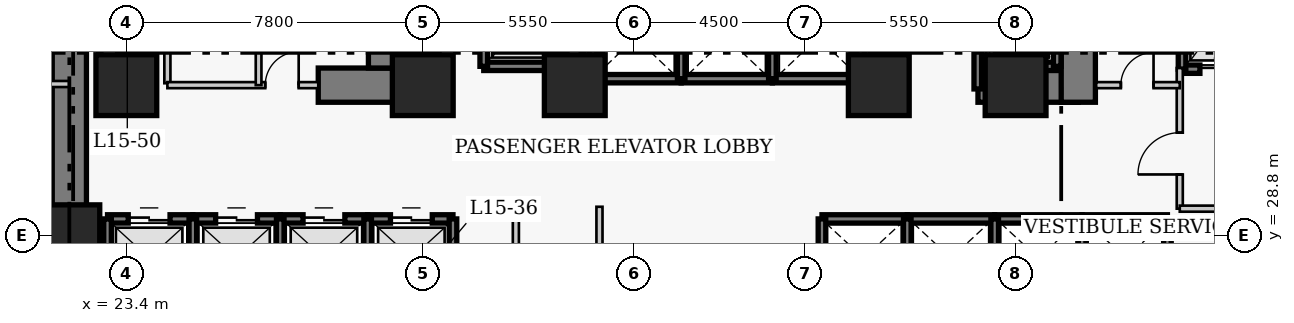
"""IFC4 building model, lengths in metres.
Left out: names, types, materials, properties, quantities, classifications, styles, units other than length and angle.
Written with IfcOpenShell. Run it as: python <this file> out.ifc"""

import sys

from ifc_helpers import new_model, si_unit, direction, frame, frame_2d, origin, origin_2d, place, context, subcontext, project, spatial, rectangle, extrude, element, fill, save


model = new_model("IFC4")
c1 = context("Model", 3, precision=1e-05, world=origin(), true_north=direction((0.0, 1.0)))
c2 = subcontext(c1, "Body", "Model", "MODEL_VIEW")
j1 = project(units=[si_unit("LENGTHUNIT", "METRE"), si_unit("PLANEANGLEUNIT", "RADIAN")], contexts=[c1])
p1 = place(None, origin())
s1 = spatial("IfcSite", under=j1, at=p1, CompositionType="ELEMENT")
p2 = place(p1, origin())
s2 = spatial("IfcBuilding", under=s1, at=p2, CompositionType="ELEMENT")
p3 = place(p2, frame((0.0, 0.0, 64.0)))
s3 = spatial("IfcBuildingStorey", under=s2, at=p3, CompositionType="ELEMENT", Elevation=64.0)
p4 = place(p3, frame((21.9, 27.05, 0.0), z_axis=(0.0, 0.0, 1.0), x_axis=(0.0, 1.0, 0.0)))
e1 = element("IfcWall", 1, at=p4, inside=s3, PredefinedType="SHEAR", context=c2, shape_type="SweptSolid", body=[
    extrude(rectangle(XDim=13.72, YDim=0.9, at=frame_2d((6.86, 0.0))), origin(), (0.0, 0.0, 1.0), 3.8),
])
p5 = place(p3, frame((28.45, 32.75, 0.0), z_axis=(0.0, 0.0, 1.0), x_axis=(1.0, 0.0, 0.0)))
e2 = element("IfcWall", 2, at=p5, inside=s3, PredefinedType="SHEAR", context=c2, shape_type="SweptSolid", body=[
    extrude(rectangle(XDim=2.4, YDim=0.9, at=frame_2d((1.2, 0.0))), origin(), (0.0, 0.0, 1.0), 3.8),
])
p6 = place(p3, frame((45.81, 32.75, 0.0), z_axis=(0.0, 0.0, 1.0), x_axis=(1.0, 0.0, 0.0)))
e3 = element("IfcWall", 3, at=p6, inside=s3, PredefinedType="SHEAR", context=c2, shape_type="SweptSolid", body=[
    extrude(rectangle(XDim=2.64, YDim=0.9, at=frame_2d((1.32, 0.0))), origin(), (0.0, 0.0, 1.0), 3.8),
])
p7 = place(p3, frame((30.22, 33.2, 0.0), z_axis=(0.0, 0.0, 1.0), x_axis=(0.0, 1.0, 0.0)))
e4 = element("IfcWall", 4, at=p7, inside=s3, PredefinedType="SHEAR", context=c2, shape_type="SweptSolid", body=[
    extrude(rectangle(XDim=7.12, YDim=0.9, at=frame_2d((3.56, 0.0))), origin(), (0.0, 0.0, 1.0), 3.8),
])
p8 = place(p3, frame((48.45, 32.3, 0.0), z_axis=(0.0, 0.0, 1.0), x_axis=(0.0, 1.0, 0.0)))
e5 = element("IfcWall", 5, at=p8, inside=s3, PredefinedType="SHEAR", context=c2, shape_type="SweptSolid", body=[
    extrude(rectangle(XDim=8.02, YDim=0.9, at=frame_2d((4.01, 0.0))), origin(), (0.0, 0.0, 1.0), 3.8),
])
p9 = place(p8, frame((5.9, 0.0, 0.0)))
e6 = element("IfcOpeningElement", 6, at=p9, cuts=e5, PredefinedType="OPENING", context=c2, shape_type="SweptSolid", body=[
    extrude(rectangle(XDim=1.1, YDim=2.15, at=frame_2d((0.55, 1.075))), frame((0.0, 0.46, 0.0), z_axis=(0.0, -1.0, 0.0), x_axis=(1.0, 0.0, 0.0)), (0.0, 0.0, 1.0), 0.92),
])
for number, where, z_axis, x_axis in (
    (7, (21.9, 28.8, 0.0), (0.0, 0.0, 1.0), (1.0, 0.0, 0.0)),
    (8, (23.4, 32.75, 0.0), (0.0, 0.0, 1.0), (1.0, 0.0, 0.0)),
    (9, (31.2, 32.75, 0.0), (0.0, 0.0, 1.0), (1.0, 0.0, 0.0)),
    (10, (35.2, 32.75, 0.0), (0.0, 0.0, 1.0), (1.0, 0.0, 0.0)),
    (11, (43.2, 32.75, 0.0), (0.0, 0.0, 1.0), (1.0, 0.0, 0.0)),
    (12, (46.8, 32.75, 0.0), (0.0, 0.0, 1.0), (1.0, 0.0, 0.0)),
):
    element("IfcColumn", number, at=place(p3, frame(where, z_axis=z_axis, x_axis=x_axis)), inside=s3, PredefinedType="COLUMN", context=c2, shape_type="SweptSolid", body=[
        extrude(rectangle(XDim=1.6, YDim=1.6, at=origin_2d()), origin(), (0.0, 0.0, 1.0), 3.8),
    ])
p10 = place(p3, frame((22.905, 29.23, 0.0), z_axis=(0.0, 0.0, 1.0), x_axis=(1.0, 0.0, 0.0)))
e13 = element("IfcWall", 13, at=p10, inside=s3, PredefinedType="SHEAR", context=c2, shape_type="SweptSolid", body=[
    extrude(rectangle(XDim=2.245, YDim=0.22, at=frame_2d((1.123, 0.0))), origin(), (0.0, 0.0, 1.0), 3.8),
])
p11 = place(p10, frame((0.545, 0.0, 0.0)))
e14 = element("IfcOpeningElement", 14, at=p11, cuts=e13, PredefinedType="OPENING", context=c2, shape_type="SweptSolid", body=[
    extrude(rectangle(XDim=1.1, YDim=2.15, at=frame_2d((0.55, 1.075))), frame((0.0, 0.12, 0.0), z_axis=(0.0, -1.0, 0.0), x_axis=(1.0, 0.0, 0.0)), (0.0, 0.0, 1.0), 0.24),
])
p12 = place(p3, frame((22.905, 27.17, 0.0), z_axis=(0.0, 0.0, 1.0), x_axis=(0.0, 1.0, 0.0)))
e15 = element("IfcWall", 15, at=p12, inside=s3, PredefinedType="SHEAR", context=c2, shape_type="SweptSolid", body=[
    extrude(rectangle(XDim=2.06, YDim=0.2, at=frame_2d((1.03, 0.0))), origin(), (0.0, 0.0, 1.0), 3.8),
])
p13 = place(p3, frame((25.15, 29.23, 0.0), z_axis=(0.0, 0.0, 1.0), x_axis=(1.0, 0.0, 0.0)))
e16 = element("IfcWall", 16, at=p13, inside=s3, PredefinedType="SHEAR", context=c2, shape_type="SweptSolid", body=[
    extrude(rectangle(XDim=2.3, YDim=0.22, at=frame_2d((1.15, 0.0))), origin(), (0.0, 0.0, 1.0), 3.8),
])
p14 = place(p13, frame((0.6, 0.0, 0.0)))
e17 = element("IfcOpeningElement", 17, at=p14, cuts=e16, PredefinedType="OPENING", context=c2, shape_type="SweptSolid", body=[
    extrude(rectangle(XDim=1.1, YDim=2.15, at=frame_2d((0.55, 1.075))), frame((0.0, 0.12, 0.0), z_axis=(0.0, -1.0, 0.0), x_axis=(1.0, 0.0, 0.0)), (0.0, 0.0, 1.0), 0.24),
])
p15 = place(p3, frame((25.15, 27.17, 0.0), z_axis=(0.0, 0.0, 1.0), x_axis=(0.0, 1.0, 0.0)))
e18 = element("IfcWall", 18, at=p15, inside=s3, PredefinedType="SHEAR", context=c2, shape_type="SweptSolid", body=[
    extrude(rectangle(XDim=2.06, YDim=0.2, at=frame_2d((1.03, 0.0))), origin(), (0.0, 0.0, 1.0), 3.8),
])
p16 = place(p3, frame((27.45, 29.23, 0.0), z_axis=(0.0, 0.0, 1.0), x_axis=(1.0, 0.0, 0.0)))
e19 = element("IfcWall", 19, at=p16, inside=s3, PredefinedType="SHEAR", context=c2, shape_type="SweptSolid", body=[
    extrude(rectangle(XDim=2.3, YDim=0.22, at=frame_2d((1.15, 0.0))), origin(), (0.0, 0.0, 1.0), 3.8),
])
p17 = place(p16, frame((0.6, 0.0, 0.0)))
e20 = element("IfcOpeningElement", 20, at=p17, cuts=e19, PredefinedType="OPENING", context=c2, shape_type="SweptSolid", body=[
    extrude(rectangle(XDim=1.1, YDim=2.15, at=frame_2d((0.55, 1.075))), frame((0.0, 0.12, 0.0), z_axis=(0.0, -1.0, 0.0), x_axis=(1.0, 0.0, 0.0)), (0.0, 0.0, 1.0), 0.24),
])
p18 = place(p3, frame((27.45, 27.17, 0.0), z_axis=(0.0, 0.0, 1.0), x_axis=(0.0, 1.0, 0.0)))
e21 = element("IfcWall", 21, at=p18, inside=s3, PredefinedType="SHEAR", context=c2, shape_type="SweptSolid", body=[
    extrude(rectangle(XDim=2.06, YDim=0.2, at=frame_2d((1.03, 0.0))), origin(), (0.0, 0.0, 1.0), 3.8),
])
p19 = place(p3, frame((29.75, 29.23, 0.0), z_axis=(0.0, 0.0, 1.0), x_axis=(1.0, 0.0, 0.0)))
e22 = element("IfcWall", 22, at=p19, inside=s3, PredefinedType="SHEAR", context=c2, shape_type="SweptSolid", body=[
    extrude(rectangle(XDim=2.245, YDim=0.22, at=frame_2d((1.123, 0.0))), origin(), (0.0, 0.0, 1.0), 3.8),
])
p20 = place(p19, frame((0.6, 0.0, 0.0)))
e23 = element("IfcOpeningElement", 23, at=p20, cuts=e22, PredefinedType="OPENING", context=c2, shape_type="SweptSolid", body=[
    extrude(rectangle(XDim=1.1, YDim=2.15, at=frame_2d((0.55, 1.075))), frame((0.0, 0.12, 0.0), z_axis=(0.0, -1.0, 0.0), x_axis=(1.0, 0.0, 0.0)), (0.0, 0.0, 1.0), 0.24),
])
for number, where, z_axis, x_axis in (
    (24, (29.75, 27.17, 0.0), (0.0, 0.0, 1.0), (0.0, 1.0, 0.0)),
    (25, (31.995, 27.17, 0.0), (0.0, 0.0, 1.0), (0.0, 1.0, 0.0)),
):
    element("IfcWall", number, at=place(p3, frame(where, z_axis=z_axis, x_axis=x_axis)), inside=s3, PredefinedType="SHEAR", context=c2, shape_type="SweptSolid", body=[
        extrude(rectangle(XDim=2.06, YDim=0.2, at=frame_2d((1.03, 0.0))), origin(), (0.0, 0.0, 1.0), 3.8),
    ])
p21 = place(p3, frame((41.705, 29.23, 0.0), z_axis=(0.0, 0.0, 1.0), x_axis=(1.0, 0.0, 0.0)))
e26 = element("IfcWall", 26, at=p21, inside=s3, PredefinedType="SHEAR", context=c2, shape_type="SweptSolid", body=[
    extrude(rectangle(XDim=2.245, YDim=0.22, at=frame_2d((1.123, 0.0))), origin(), (0.0, 0.0, 1.0), 3.8),
])
p22 = place(p3, frame((41.705, 27.17, 0.0), z_axis=(0.0, 0.0, 1.0), x_axis=(0.0, 1.0, 0.0)))
e27 = element("IfcWall", 27, at=p22, inside=s3, PredefinedType="SHEAR", context=c2, shape_type="SweptSolid", body=[
    extrude(rectangle(XDim=2.06, YDim=0.2, at=frame_2d((1.03, 0.0))), origin(), (0.0, 0.0, 1.0), 3.8),
])
p23 = place(p3, frame((43.95, 29.23, 0.0), z_axis=(0.0, 0.0, 1.0), x_axis=(1.0, 0.0, 0.0)))
e28 = element("IfcWall", 28, at=p23, inside=s3, PredefinedType="SHEAR", context=c2, shape_type="SweptSolid", body=[
    extrude(rectangle(XDim=2.3, YDim=0.22, at=frame_2d((1.15, 0.0))), origin(), (0.0, 0.0, 1.0), 3.8),
])
p24 = place(p3, frame((43.95, 27.17, 0.0), z_axis=(0.0, 0.0, 1.0), x_axis=(0.0, 1.0, 0.0)))
e29 = element("IfcWall", 29, at=p24, inside=s3, PredefinedType="SHEAR", context=c2, shape_type="SweptSolid", body=[
    extrude(rectangle(XDim=2.06, YDim=0.2, at=frame_2d((1.03, 0.0))), origin(), (0.0, 0.0, 1.0), 3.8),
])
p25 = place(p3, frame((46.25, 29.23, 0.0), z_axis=(0.0, 0.0, 1.0), x_axis=(1.0, 0.0, 0.0)))
e30 = element("IfcWall", 30, at=p25, inside=s3, PredefinedType="SHEAR", context=c2, shape_type="SweptSolid", body=[
    extrude(rectangle(XDim=2.3, YDim=0.22, at=frame_2d((1.15, 0.0))), origin(), (0.0, 0.0, 1.0), 3.8),
])
p26 = place(p3, frame((46.25, 27.17, 0.0), z_axis=(0.0, 0.0, 1.0), x_axis=(0.0, 1.0, 0.0)))
e31 = element("IfcWall", 31, at=p26, inside=s3, PredefinedType="SHEAR", context=c2, shape_type="SweptSolid", body=[
    extrude(rectangle(XDim=2.06, YDim=0.2, at=frame_2d((1.03, 0.0))), origin(), (0.0, 0.0, 1.0), 3.8),
])
p27 = place(p3, frame((48.55, 29.23, 0.0), z_axis=(0.0, 0.0, 1.0), x_axis=(1.0, 0.0, 0.0)))
e32 = element("IfcWall", 32, at=p27, inside=s3, PredefinedType="SHEAR", context=c2, shape_type="SweptSolid", body=[
    extrude(rectangle(XDim=2.245, YDim=0.22, at=frame_2d((1.123, 0.0))), origin(), (0.0, 0.0, 1.0), 3.8),
])
for number, where, z_axis, x_axis in (
    (33, (48.55, 27.17, 0.0), (0.0, 0.0, 1.0), (0.0, 1.0, 0.0)),
    (34, (50.795, 27.17, 0.0), (0.0, 0.0, 1.0), (0.0, 1.0, 0.0)),
):
    element("IfcWall", number, at=place(p3, frame(where, z_axis=z_axis, x_axis=x_axis)), inside=s3, PredefinedType="SHEAR", context=c2, shape_type="SweptSolid", body=[
        extrude(rectangle(XDim=2.06, YDim=0.2, at=frame_2d((1.03, 0.0))), origin(), (0.0, 0.0, 1.0), 3.8),
    ])
p28 = place(p3, frame((35.68, 32.92, 0.0), z_axis=(0.0, 0.0, 1.0), x_axis=(1.0, 0.0, 0.0)))
e35 = element("IfcWall", 35, at=p28, inside=s3, PredefinedType="SHEAR", context=c2, shape_type="SweptSolid", body=[
    extrude(rectangle(XDim=2.32, YDim=0.22, at=frame_2d((1.16, 0.0))), origin(), (0.0, 0.0, 1.0), 3.8),
])
p29 = place(p3, frame((35.68, 32.92, 0.0), z_axis=(0.0, 0.0, 1.0), x_axis=(0.0, 1.0, 0.0)))
e36 = element("IfcWall", 36, at=p29, inside=s3, PredefinedType="SHEAR", context=c2, shape_type="SweptSolid", body=[
    extrude(rectangle(XDim=2.16, YDim=0.2, at=frame_2d((1.08, 0.0))), origin(), (0.0, 0.0, 1.0), 3.8),
])
p30 = place(p3, frame((38.0, 32.92, 0.0), z_axis=(0.0, 0.0, 1.0), x_axis=(1.0, 0.0, 0.0)))
e37 = element("IfcWall", 37, at=p30, inside=s3, PredefinedType="SHEAR", context=c2, shape_type="SweptSolid", body=[
    extrude(rectangle(XDim=2.4, YDim=0.22, at=frame_2d((1.2, 0.0))), origin(), (0.0, 0.0, 1.0), 3.8),
])
p31 = place(p3, frame((38.0, 32.92, 0.0), z_axis=(0.0, 0.0, 1.0), x_axis=(0.0, 1.0, 0.0)))
e38 = element("IfcWall", 38, at=p31, inside=s3, PredefinedType="SHEAR", context=c2, shape_type="SweptSolid", body=[
    extrude(rectangle(XDim=2.16, YDim=0.2, at=frame_2d((1.08, 0.0))), origin(), (0.0, 0.0, 1.0), 3.8),
])
p32 = place(p3, frame((40.4, 32.92, 0.0), z_axis=(0.0, 0.0, 1.0), x_axis=(1.0, 0.0, 0.0)))
e39 = element("IfcWall", 39, at=p32, inside=s3, PredefinedType="SHEAR", context=c2, shape_type="SweptSolid", body=[
    extrude(rectangle(XDim=2.32, YDim=0.22, at=frame_2d((1.16, 0.0))), origin(), (0.0, 0.0, 1.0), 3.8),
])
for number, where, z_axis, x_axis in (
    (40, (40.4, 32.92, 0.0), (0.0, 0.0, 1.0), (0.0, 1.0, 0.0)),
    (41, (42.72, 32.92, 0.0), (0.0, 0.0, 1.0), (0.0, 1.0, 0.0)),
):
    element("IfcWall", number, at=place(p3, frame(where, z_axis=z_axis, x_axis=x_axis)), inside=s3, PredefinedType="SHEAR", context=c2, shape_type="SweptSolid", body=[
        extrude(rectangle(XDim=2.16, YDim=0.2, at=frame_2d((1.08, 0.0))), origin(), (0.0, 0.0, 1.0), 3.8),
    ])
p33 = place(p3, frame((51.18, 33.17, 0.0), z_axis=(0.0, 0.0, 1.0), x_axis=(1.0, 0.0, 0.0)))
e42 = element("IfcWall", 42, at=p33, inside=s3, PredefinedType="SHEAR", context=c2, shape_type="SweptSolid", body=[
    extrude(rectangle(XDim=2.42, YDim=0.22, at=frame_2d((1.21, 0.0))), origin(), (0.0, 0.0, 1.0), 3.8),
])
p34 = place(p33, frame((0.47, 0.0, 0.0)))
e43 = element("IfcOpeningElement", 43, at=p34, cuts=e42, PredefinedType="OPENING", context=c2, shape_type="SweptSolid", body=[
    extrude(rectangle(XDim=1.3, YDim=2.15, at=frame_2d((0.65, 1.075))), frame((0.0, 0.12, 0.0), z_axis=(0.0, -1.0, 0.0), x_axis=(1.0, 0.0, 0.0)), (0.0, 0.0, 1.0), 0.24),
])
p35 = place(p3, frame((51.18, 33.17, 0.0), z_axis=(0.0, 0.0, 1.0), x_axis=(0.0, 1.0, 0.0)))
e44 = element("IfcWall", 44, at=p35, inside=s3, PredefinedType="SHEAR", context=c2, shape_type="SweptSolid", body=[
    extrude(rectangle(XDim=2.86, YDim=0.2, at=frame_2d((1.43, 0.0))), origin(), (0.0, 0.0, 1.0), 3.8),
])
p36 = place(p3, frame((32.805, 33.245, 0.0), z_axis=(0.0, 0.0, 1.0), x_axis=(1.0, 0.0, 0.0)))
e45 = element("IfcWall", 45, at=p36, inside=s3, PredefinedType="SHEAR", context=c2, shape_type="SweptSolid", body=[
    extrude(rectangle(XDim=2.09, YDim=0.22, at=frame_2d((1.045, 0.0))), origin(), (0.0, 0.0, 1.0), 3.8),
])
for number, where, z_axis, x_axis in (
    (46, (32.805, 33.245, 0.0), (0.0, 0.0, 1.0), (0.0, 1.0, 0.0)),
    (47, (34.895, 33.245, 0.0), (0.0, 0.0, 1.0), (0.0, 1.0, 0.0)),
):
    element("IfcWall", number, at=place(p3, frame(where, z_axis=z_axis, x_axis=x_axis)), inside=s3, PredefinedType="SHEAR", context=c2, shape_type="SweptSolid", body=[
        extrude(rectangle(XDim=2.91, YDim=0.2, at=frame_2d((1.455, 0.0))), origin(), (0.0, 0.0, 1.0), 3.8),
    ])
p37 = place(p3, frame((45.805, 33.245, 0.0), z_axis=(0.0, 0.0, 1.0), x_axis=(1.0, 0.0, 0.0)))
e48 = element("IfcWall", 48, at=p37, inside=s3, PredefinedType="SHEAR", context=c2, shape_type="SweptSolid", body=[
    extrude(rectangle(XDim=2.09, YDim=0.22, at=frame_2d((1.045, 0.0))), origin(), (0.0, 0.0, 1.0), 3.8),
])
p38 = place(p3, frame((45.805, 32.65, 0.0), z_axis=(0.0, 0.0, 1.0), x_axis=(0.0, 1.0, 0.0)))
e49 = element("IfcWall", 49, at=p38, inside=s3, PredefinedType="SHEAR", context=c2, shape_type="SweptSolid", body=[
    extrude(rectangle(XDim=3.505, YDim=0.2, at=frame_2d((1.752, 0.0))), origin(), (0.0, 0.0, 1.0), 3.8),
])
p39 = place(p3, frame((47.895, 33.245, 0.0), z_axis=(0.0, 0.0, 1.0), x_axis=(0.0, 1.0, 0.0)))
e50 = element("IfcWall", 50, at=p39, inside=s3, PredefinedType="SHEAR", context=c2, shape_type="SweptSolid", body=[
    extrude(rectangle(XDim=2.91, YDim=0.2, at=frame_2d((1.455, 0.0))), origin(), (0.0, 0.0, 1.0), 3.8),
])
p40 = place(p3, frame((24.48, 32.8, 0.0), z_axis=(0.0, 0.0, 1.0), x_axis=(0.0, 1.0, 0.0)))
e51 = element("IfcWall", 51, at=p40, inside=s3, PredefinedType="PARTITIONING", context=c2, shape_type="SweptSolid", body=[
    extrude(rectangle(XDim=3.57, YDim=0.16, at=frame_2d((1.785, 0.0))), origin(), (0.0, 0.0, 1.0), 3.54),
])
p41 = place(p40, frame((1.604, 0.0, 0.0)))
e52 = element("IfcOpeningElement", 52, at=p41, cuts=e51, PredefinedType="OPENING", context=c2, shape_type="SweptSolid", body=[
    extrude(rectangle(XDim=0.9, YDim=2.1, at=frame_2d((0.45, 1.05))), frame((0.0, 0.09, 0.0), z_axis=(0.0, -1.0, 0.0), x_axis=(1.0, 0.0, 0.0)), (0.0, 0.0, 1.0), 0.18),
])
p42 = place(p3, frame((51.12, 29.5, 0.0), z_axis=(0.0, 0.0, 1.0), x_axis=(0.0, 1.0, 0.0)))
e53 = element("IfcWall", 53, at=p42, inside=s3, PredefinedType="PARTITIONING", context=c2, shape_type="SweptSolid", body=[
    extrude(rectangle(XDim=3.7, YDim=0.16, at=frame_2d((1.85, 0.0))), origin(), (0.0, 0.0, 1.0), 3.54),
])
p43 = place(p42, frame((0.9, 0.0, 0.0)))
e54 = element("IfcOpeningElement", 54, at=p43, cuts=e53, PredefinedType="OPENING", context=c2, shape_type="SweptSolid", body=[
    extrude(rectangle(XDim=1.1, YDim=2.15, at=frame_2d((0.55, 1.075))), frame((0.0, 0.09, 0.0), z_axis=(0.0, -1.0, 0.0), x_axis=(1.0, 0.0, 0.0)), (0.0, 0.0, 1.0), 0.18),
])
p44 = place(p3, frame((51.12, 29.5, 0.0), z_axis=(0.0, 0.0, 1.0), x_axis=(1.0, 0.0, 0.0)))
e55 = element("IfcWall", 55, at=p44, inside=s3, PredefinedType="PARTITIONING", context=c2, shape_type="SweptSolid", body=[
    extrude(rectangle(XDim=5.63, YDim=0.16, at=frame_2d((2.815, 0.0))), origin(), (0.0, 0.0, 1.0), 3.54),
])
p45 = place(p3, frame((24.48, 32.75, 0.0), z_axis=(0.0, 0.0, 1.0), x_axis=(1.0, 0.0, 0.0)))
e56 = element("IfcWall", 56, at=p45, inside=s3, PredefinedType="PARTITIONING", context=c2, shape_type="SweptSolid", body=[
    extrude(rectangle(XDim=3.97, YDim=0.16, at=frame_2d((1.985, 0.0))), origin(), (0.0, 0.0, 1.0), 3.54),
])
p46 = place(p45, frame((2.575, 0.0, 0.0)))
e57 = element("IfcOpeningElement", 57, at=p46, cuts=e56, PredefinedType="OPENING", context=c2, shape_type="SweptSolid", body=[
    extrude(rectangle(XDim=0.88, YDim=2.05, at=frame_2d((0.44, 1.025))), frame((0.0, 0.09, 0.0), z_axis=(0.0, -1.0, 0.0), x_axis=(1.0, 0.0, 0.0)), (0.0, 0.0, 1.0), 0.18),
])
p47 = place(p3, frame((48.92, 32.75, 0.0), z_axis=(0.0, 0.0, 1.0), x_axis=(1.0, 0.0, 0.0)))
e58 = element("IfcWall", 58, at=p47, inside=s3, PredefinedType="PARTITIONING", context=c2, shape_type="SweptSolid", body=[
    extrude(rectangle(XDim=2.2, YDim=0.16, at=frame_2d((1.1, 0.0))), origin(), (0.0, 0.0, 1.0), 3.54),
])
p48 = place(p47, frame((0.65, 0.0, 0.0)))
e59 = element("IfcOpeningElement", 59, at=p48, cuts=e58, PredefinedType="OPENING", context=c2, shape_type="SweptSolid", body=[
    extrude(rectangle(XDim=0.86, YDim=2.05, at=frame_2d((0.43, 1.025))), frame((0.0, 0.09, 0.0), z_axis=(0.0, -1.0, 0.0), x_axis=(1.0, 0.0, 0.0)), (0.0, 0.0, 1.0), 0.18),
])
p49 = place(p3, frame((26.88, 32.75, 0.0), z_axis=(0.0, 0.0, 1.0), x_axis=(0.0, 1.0, 0.0)))
e60 = element("IfcWall", 60, at=p49, inside=s3, PredefinedType="PARTITIONING", context=c2, shape_type="SweptSolid", body=[
    extrude(rectangle(XDim=3.62, YDim=0.15, at=frame_2d((1.81, 0.0))), origin(), (0.0, 0.0, 1.0), 3.54),
])
for number, where, z_axis, x_axis in (
    (61, (33.65, 25.31, 0.0), (0.0, 0.0, 1.0), (0.0, 1.0, 0.0)),
    (62, (35.85, 25.31, 0.0), (0.0, 0.0, 1.0), (0.0, 1.0, 0.0)),
):
    element("IfcWall", number, at=place(p3, frame(where, z_axis=z_axis, x_axis=x_axis)), inside=s3, PredefinedType="PARTITIONING", context=c2, shape_type="SweptSolid", body=[
        extrude(rectangle(XDim=4.24, YDim=0.16, at=frame_2d((2.12, 0.0))), origin(), (0.0, 0.0, 1.0), 3.54),
    ])
p50 = place(p3, frame((19.96, 32.78, 0.0), z_axis=(0.0, 0.0, 1.0), x_axis=(1.0, 0.0, 0.0)))
e63 = element("IfcWall", 63, at=p50, inside=s3, PredefinedType="PARTITIONING", context=c2, shape_type="SweptSolid", body=[
    extrude(rectangle(XDim=1.94, YDim=0.16, at=frame_2d((0.97, 0.0))), origin(), (0.0, 0.0, 1.0), 3.54),
])
p51 = place(p11, origin())
e64 = element("IfcDoor", 64, at=p51, inside=s3, OperationType="DOUBLE_DOOR_SLIDING", PredefinedType="DOOR", context=c2, shape_type="SweptSolid", body=[
    extrude(rectangle(XDim=1.1, YDim=2.15, at=frame_2d((0.55, 1.075))), frame((0.0, 0.025, 0.0), z_axis=(0.0, -1.0, 0.0), x_axis=(1.0, 0.0, 0.0)), (0.0, 0.0, 1.0), 0.05),
])
fill(e14, e64)
p52 = place(p14, origin())
e65 = element("IfcDoor", 65, at=p52, inside=s3, OperationType="DOUBLE_DOOR_SLIDING", PredefinedType="DOOR", context=c2, shape_type="SweptSolid", body=[
    extrude(rectangle(XDim=1.1, YDim=2.15, at=frame_2d((0.55, 1.075))), frame((0.0, 0.025, 0.0), z_axis=(0.0, -1.0, 0.0), x_axis=(1.0, 0.0, 0.0)), (0.0, 0.0, 1.0), 0.05),
])
fill(e17, e65)
p53 = place(p17, origin())
e66 = element("IfcDoor", 66, at=p53, inside=s3, OperationType="DOUBLE_DOOR_SLIDING", PredefinedType="DOOR", context=c2, shape_type="SweptSolid", body=[
    extrude(rectangle(XDim=1.1, YDim=2.15, at=frame_2d((0.55, 1.075))), frame((0.0, 0.025, 0.0), z_axis=(0.0, -1.0, 0.0), x_axis=(1.0, 0.0, 0.0)), (0.0, 0.0, 1.0), 0.05),
])
fill(e20, e66)
p54 = place(p20, origin())
e67 = element("IfcDoor", 67, at=p54, inside=s3, OperationType="DOUBLE_DOOR_SLIDING", PredefinedType="DOOR", context=c2, shape_type="SweptSolid", body=[
    extrude(rectangle(XDim=1.1, YDim=2.15, at=frame_2d((0.55, 1.075))), frame((0.0, 0.025, 0.0), z_axis=(0.0, -1.0, 0.0), x_axis=(1.0, 0.0, 0.0)), (0.0, 0.0, 1.0), 0.05),
])
fill(e23, e67)
p55 = place(p34, origin())
e68 = element("IfcDoor", 68, at=p55, inside=s3, OperationType="DOUBLE_DOOR_SLIDING", PredefinedType="DOOR", context=c2, shape_type="SweptSolid", body=[
    extrude(rectangle(XDim=1.3, YDim=2.15, at=frame_2d((0.65, 1.075))), frame((0.0, 0.025, 0.0), z_axis=(0.0, -1.0, 0.0), x_axis=(1.0, 0.0, 0.0)), (0.0, 0.0, 1.0), 0.05),
])
fill(e43, e68)
p56 = place(p43, origin())
e69 = element("IfcDoor", 69, at=p56, inside=s3, OperationType="SINGLE_SWING_LEFT", PredefinedType="DOOR", context=c2, shape_type="SweptSolid", body=[
    extrude(rectangle(XDim=1.1, YDim=2.15, at=frame_2d((0.55, 1.075))), frame((0.0, 0.025, 0.0), z_axis=(0.0, -1.0, 0.0), x_axis=(1.0, 0.0, 0.0)), (0.0, 0.0, 1.0), 0.05),
])
fill(e54, e69)
p57 = place(p46, origin())
e70 = element("IfcDoor", 70, at=p57, inside=s3, OperationType="SINGLE_SWING_RIGHT", PredefinedType="DOOR", context=c2, shape_type="SweptSolid", body=[
    extrude(rectangle(XDim=0.88, YDim=2.05, at=frame_2d((0.44, 1.025))), frame((0.0, 0.025, 0.0), z_axis=(0.0, -1.0, 0.0), x_axis=(1.0, 0.0, 0.0)), (0.0, 0.0, 1.0), 0.05),
])
fill(e57, e70)
p58 = place(p48, origin())
e71 = element("IfcDoor", 71, at=p58, inside=s3, OperationType="SINGLE_SWING_RIGHT", PredefinedType="DOOR", context=c2, shape_type="SweptSolid", body=[
    extrude(rectangle(XDim=0.86, YDim=2.05, at=frame_2d((0.43, 1.025))), frame((0.0, 0.025, 0.0), z_axis=(0.0, -1.0, 0.0), x_axis=(1.0, 0.0, 0.0)), (0.0, 0.0, 1.0), 0.05),
])
fill(e59, e71)
save(model, sys.argv[1])
